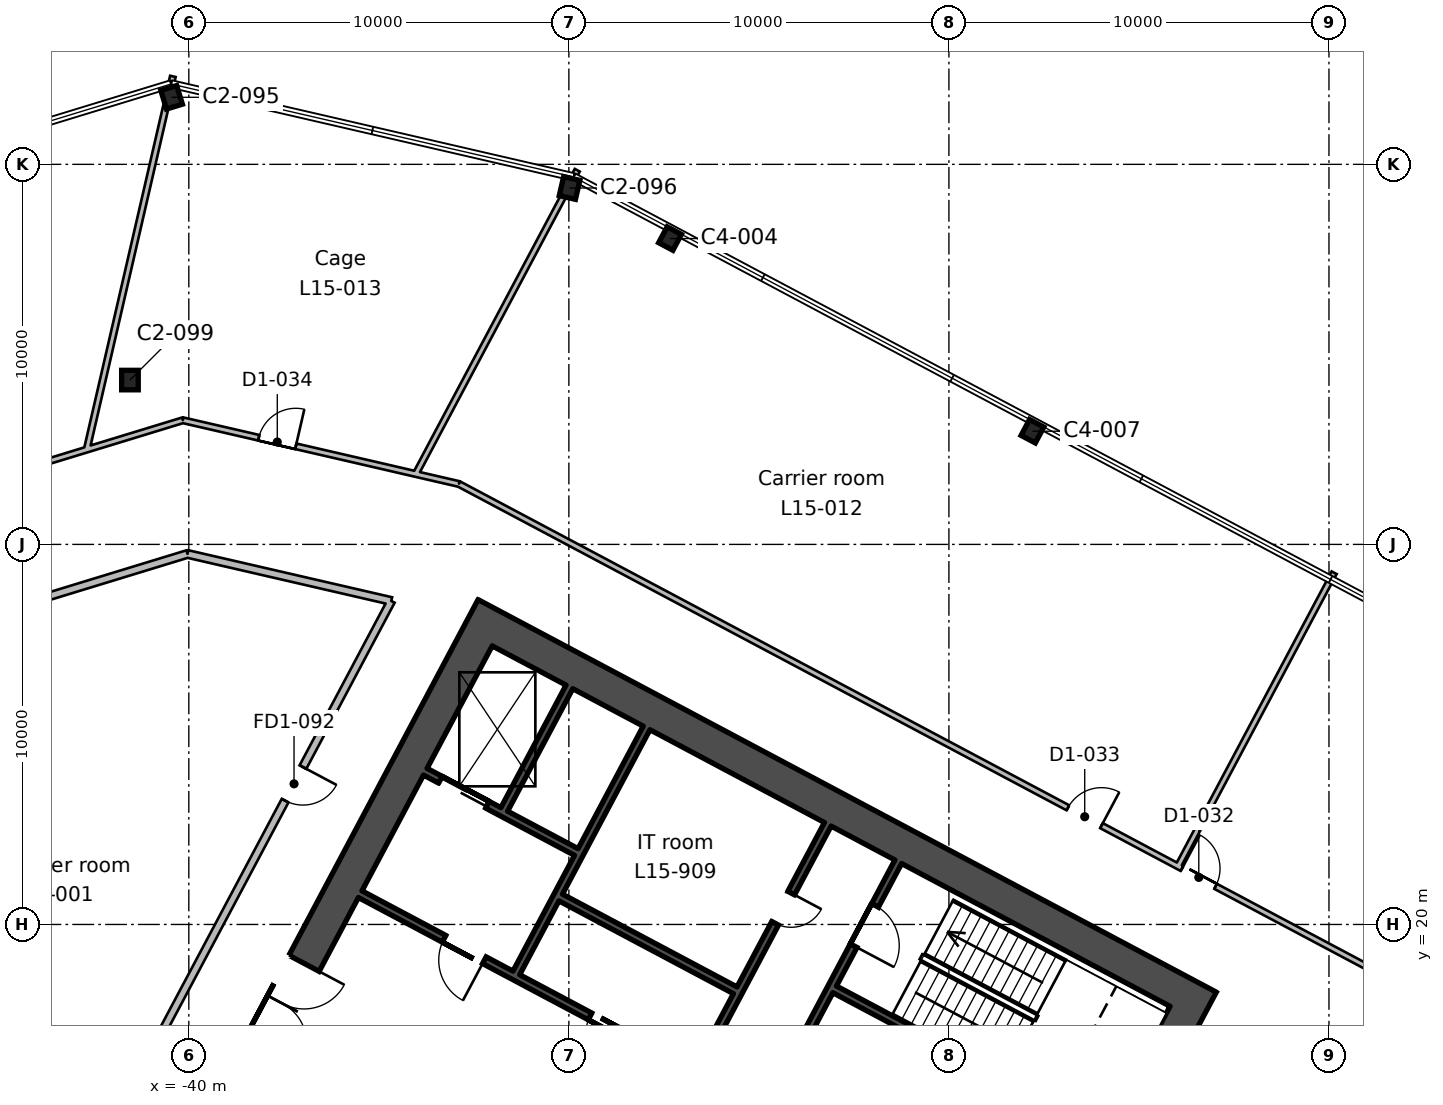
"""IFC4 building model, lengths in metres.
Left out: names, types, materials, properties, quantities, classifications, styles, units other than length and angle.
Written with IfcOpenShell. Run it as: python <this file> out.ifc"""

import sys

from ifc_helpers import new_model, si_unit, direction, frame, frame_2d, origin, origin_2d, place, context, subcontext, project, spatial, rectangle, i_section, extrude, element, fill, save


model = new_model("IFC4")
c1 = context("Model", 3, precision=1e-05, world=origin(), true_north=direction((0.0, 1.0)))
c2 = subcontext(c1, "Body", "Model", "MODEL_VIEW")
j1 = project(units=[si_unit("LENGTHUNIT", "METRE"), si_unit("PLANEANGLEUNIT", "RADIAN")], contexts=[c1])
p1 = place(None, origin())
s1 = spatial("IfcSite", under=j1, at=p1, CompositionType="ELEMENT")
p2 = place(p1, origin())
s2 = spatial("IfcBuilding", under=s1, at=p2, CompositionType="ELEMENT")
p3 = place(p2, frame((0.0, 0.0, 80.0)))
s3 = spatial("IfcBuildingStorey", under=s2, at=p3, CompositionType="ELEMENT", Elevation=80.0)
p4 = place(p3, frame((-17.802, 32.978, 0.0), z_axis=(0.0, 0.0, 1.0), x_axis=(-0.882947592859, 0.469471562786, 0.0)))
e1 = element("IfcColumn", 1, at=p4, inside=s3, PredefinedType="COLUMN", context=c2, shape_type="SweptSolid", body=[
    extrude(i_section(OverallWidth=0.424, OverallDepth=0.475, WebThickness=0.048, FlangeThickness=0.077, FilletRadius=0.015, at=origin_2d()), origin(), (0.0, 0.0, 1.0), 4.6),
])
p5 = place(p3, frame((-41.549, 34.324, 0.0), z_axis=(0.0, 0.0, 1.0), x_axis=(1.0, 0.0, 0.0)))
e2 = element("IfcColumn", 2, at=p5, inside=s3, PredefinedType="COLUMN", context=c2, shape_type="SweptSolid", body=[
    extrude(i_section(OverallWidth=0.437, OverallDepth=0.513, WebThickness=0.061, FlangeThickness=0.097, FilletRadius=0.015, at=origin_2d()), origin(), (0.0, 0.0, 1.0), 4.6),
])
p6 = place(p3, frame((-27.338, 38.048, 0.0), z_axis=(0.0, 0.0, 1.0), x_axis=(-0.882947592859, 0.469471562786, 0.0)))
e3 = element("IfcColumn", 3, at=p6, inside=s3, PredefinedType="COLUMN", context=c2, shape_type="SweptSolid", body=[
    extrude(i_section(OverallWidth=0.424, OverallDepth=0.475, WebThickness=0.048, FlangeThickness=0.077, FilletRadius=0.015, at=origin_2d()), origin(), (0.0, 0.0, 1.0), 4.6),
])
for number, where, z_axis, x_axis in (
    (4, (-29.982, 39.378, 0.0), (0.0, 0.0, 1.0), (-0.974, 0.225, 0.0)),
    (5, (-40.453, 41.764, 0.0), (0.0, 0.0, 1.0), (-0.956, -0.292, 0.0)),
):
    element("IfcColumn", number, at=place(p3, frame(where, z_axis=z_axis, x_axis=x_axis)), inside=s3, PredefinedType="COLUMN", context=c2, shape_type="SweptSolid", body=[
        extrude(i_section(OverallWidth=0.437, OverallDepth=0.513, WebThickness=0.061, FlangeThickness=0.097, FilletRadius=0.015, at=origin_2d()), origin(), (0.0, 0.0, 1.0), 4.6),
    ])
p7 = place(p3, frame((-13.362, 18.43, 0.0), z_axis=(0.0, 0.0, 1.0), x_axis=(-0.46947084998, -0.882947971864, 0.0)))
e6 = element("IfcWall", 6, at=p7, inside=s3, PredefinedType="SHEAR", context=c2, shape_type="SweptSolid", body=[
    extrude(rectangle(XDim=20.0, YDim=0.9, at=frame_2d((10.0, 0.0))), origin(), (0.0, 0.0, 1.0), 4.6),
])
p8 = place(p7, frame((7.0, 0.0, 0.0)))
e7 = element("IfcOpeningElement", 7, at=p8, cuts=e6, PredefinedType="OPENING", context=c2, shape_type="SweptSolid", body=[
    extrude(rectangle(XDim=2.4, YDim=2.4, at=frame_2d((1.2, 1.2))), frame((0.0, 0.46, 0.0), z_axis=(0.0, -1.0, 0.0), x_axis=(1.0, 0.0, 0.0)), (0.0, 0.0, 1.0), 0.92),
])
p9 = place(p3, frame((-31.992, 28.336, 0.0), z_axis=(0.0, 0.0, 1.0), x_axis=(-0.46947084998, -0.882947971864, 0.0)))
e8 = element("IfcWall", 8, at=p9, inside=s3, PredefinedType="SHEAR", context=c2, shape_type="SweptSolid", body=[
    extrude(rectangle(XDim=20.0, YDim=0.9, at=frame_2d((10.0, 0.0))), origin(), (0.0, 0.0, 1.0), 4.6),
])
p10 = place(p9, frame((10.6, 0.0, 0.0)))
e9 = element("IfcOpeningElement", 9, at=p10, cuts=e8, PredefinedType="OPENING", context=c2, shape_type="SweptSolid", body=[
    extrude(rectangle(XDim=2.4, YDim=2.4, at=frame_2d((1.2, 1.2))), frame((0.0, 0.46, 0.0), z_axis=(0.0, -1.0, 0.0), x_axis=(1.0, 0.0, 0.0)), (0.0, 0.0, 1.0), 0.92),
])
p11 = place(p3, frame((-13.97, 18.244, 0.0), z_axis=(0.0, 0.0, 1.0), x_axis=(-0.88294509198, 0.469476266226, 0.0)))
e10 = element("IfcWall", 10, at=p11, inside=s3, PredefinedType="SHEAR", context=c2, shape_type="SweptSolid", body=[
    extrude(rectangle(XDim=20.2, YDim=0.9, at=frame_2d((10.1, 0.0))), origin(), (0.0, 0.0, 1.0), 4.6),
])
p12 = place(p3, frame((-21.333, 21.649, 0.0), z_axis=(0.0, 0.0, 1.0), x_axis=(-0.469494272526, -0.882935517501, 0.0)))
e11 = element("IfcWall", 11, at=p12, inside=s3, PredefinedType="SHEAR", context=c2, shape_type="SweptSolid", body=[
    extrude(rectangle(XDim=7.3, YDim=0.2, at=frame_2d((3.65, 0.0))), origin(), (0.0, 0.0, 1.0), 4.6),
])
p13 = place(p12, frame((1.3, 0.0, 0.0)))
e12 = element("IfcOpeningElement", 12, at=p13, cuts=e11, PredefinedType="OPENING", context=c2, shape_type="SweptSolid", body=[
    extrude(rectangle(XDim=1.2, YDim=2.1, at=frame_2d((0.6, 1.05))), frame((0.0, 0.11, 0.0), z_axis=(0.0, -1.0, 0.0), x_axis=(1.0, 0.0, 0.0)), (0.0, 0.0, 1.0), 0.22),
])
p14 = place(p3, frame((-23.188, 22.635, 0.0), z_axis=(0.0, 0.0, 1.0), x_axis=(-0.469454336211, -0.882956752176, 0.0)))
e13 = element("IfcWall", 13, at=p14, inside=s3, PredefinedType="SHEAR", context=c2, shape_type="SweptSolid", body=[
    extrude(rectangle(XDim=7.3, YDim=0.2, at=frame_2d((3.65, 0.0))), origin(), (0.0, 0.0, 1.0), 4.6),
])
p15 = place(p14, frame((2.05, 0.0, 0.0)))
e14 = element("IfcOpeningElement", 14, at=p15, cuts=e13, PredefinedType="OPENING", context=c2, shape_type="SweptSolid", body=[
    extrude(rectangle(XDim=0.9, YDim=2.1, at=frame_2d((0.45, 1.05))), frame((0.0, 0.11, 0.0), z_axis=(0.0, -1.0, 0.0), x_axis=(1.0, 0.0, 0.0)), (0.0, 0.0, 1.0), 0.22),
])
p16 = place(p3, frame((-27.955, 25.171, 0.0), z_axis=(0.0, 0.0, 1.0), x_axis=(-0.469480409012, -0.88294288918, 0.0)))
e15 = element("IfcWall", 15, at=p16, inside=s3, PredefinedType="SHEAR", context=c2, shape_type="SweptSolid", body=[
    extrude(rectangle(XDim=7.3, YDim=0.2, at=frame_2d((3.65, 0.0))), origin(), (0.0, 0.0, 1.0), 4.6),
])
p17 = place(p3, frame((-29.986, 26.25, 0.0), z_axis=(0.0, 0.0, 1.0), x_axis=(-0.469494272526, -0.882935517501, 0.0)))
e16 = element("IfcWall", 16, at=p17, inside=s3, PredefinedType="SHEAR", context=c2, shape_type="SweptSolid", body=[
    extrude(rectangle(XDim=3.65, YDim=0.2, at=frame_2d((1.825, 0.0))), origin(), (0.0, 0.0, 1.0), 4.6),
])
p18 = place(p3, frame((-15.942, 14.536, 0.0), z_axis=(0.0, 0.0, 1.0), x_axis=(-0.882946947542, 0.469472776449, 0.0)))
e17 = element("IfcWall", 17, at=p18, inside=s3, PredefinedType="SHEAR", context=c2, shape_type="SweptSolid", body=[
    extrude(rectangle(XDim=8.0, YDim=0.2, at=frame_2d((4.0, 0.0))), origin(), (0.0, 0.0, 1.0), 4.6),
])
p19 = place(p3, frame((-29.804, 21.906, 0.0), z_axis=(0.0, 0.0, 1.0), x_axis=(-0.882960433586, 0.469447412093, 0.0)))
e18 = element("IfcWall", 18, at=p19, inside=s3, PredefinedType="SHEAR", context=c2, shape_type="SweptSolid", body=[
    extrude(rectangle(XDim=4.5, YDim=0.2, at=frame_2d((2.25, 0.0))), origin(), (0.0, 0.0, 1.0), 4.6),
])
p20 = place(p19, frame((2.65, 0.0, 0.0)))
e19 = element("IfcOpeningElement", 19, at=p20, cuts=e18, PredefinedType="OPENING", context=c2, shape_type="SweptSolid", body=[
    extrude(rectangle(XDim=1.4, YDim=2.4, at=frame_2d((0.7, 1.2))), frame((0.0, 0.11, 0.0), z_axis=(0.0, -1.0, 0.0), x_axis=(1.0, 0.0, 0.0)), (0.0, 0.0, 1.0), 0.22),
])
p21 = place(p3, frame((-25.623, 18.268, 0.0), z_axis=(0.0, 0.0, 1.0), x_axis=(-0.882953967957, 0.469459572775, 0.0)))
e20 = element("IfcWall", 20, at=p21, inside=s3, PredefinedType="SHEAR", context=c2, shape_type="SweptSolid", body=[
    extrude(rectangle(XDim=5.2, YDim=0.2, at=frame_2d((2.6, 0.0))), origin(), (0.0, 0.0, 1.0), 4.6),
])
p22 = place(p3, frame((-26.662, 16.102, 0.0), z_axis=(0.0, 0.0, 1.0), x_axis=(-0.882940221191, 0.469485426614, 0.0)))
e21 = element("IfcWall", 21, at=p22, inside=s3, PredefinedType="SHEAR", context=c2, shape_type="SweptSolid", body=[
    extrude(rectangle(XDim=10.0, YDim=0.2, at=frame_2d((5.0, 0.0))), origin(), (0.0, 0.0, 1.0), 4.6),
])
p23 = place(p22, frame((6.3, 0.0, 0.0)))
e22 = element("IfcOpeningElement", 22, at=p23, cuts=e21, PredefinedType="OPENING", context=c2, shape_type="SweptSolid", body=[
    extrude(rectangle(XDim=1.2, YDim=2.1, at=frame_2d((0.6, 1.05))), frame((0.0, 0.11, 0.0), z_axis=(0.0, -1.0, 0.0), x_axis=(1.0, 0.0, 0.0)), (0.0, 0.0, 1.0), 0.22),
])
p24 = place(p22, frame((2.25, 0.0, 0.0)))
e23 = element("IfcOpeningElement", 23, at=p24, cuts=e21, PredefinedType="OPENING", context=c2, shape_type="SweptSolid", body=[
    extrude(rectangle(XDim=0.9, YDim=2.1, at=frame_2d((0.45, 1.05))), frame((0.0, 0.11, 0.0), z_axis=(0.0, -1.0, 0.0), x_axis=(1.0, 0.0, 0.0)), (0.0, 0.0, 1.0), 0.22),
])
p25 = place(p3, frame((-42.653, 32.504, 0.0), z_axis=(0.0, 0.0, 1.0), x_axis=(-0.95632425254, -0.292307926687, 0.0)))
e24 = element("IfcWall", 24, at=p25, inside=s3, PredefinedType="PARTITIONING", context=c2, shape_type="SweptSolid", body=[
    extrude(rectangle(XDim=3.677, YDim=0.15, at=frame_2d((1.839, 0.0))), origin(), (0.0, 0.0, 1.0), 4.2),
])
p26 = place(p25, frame((1.461, 0.0, 0.0)))
e25 = element("IfcOpeningElement", 25, at=p26, cuts=e24, PredefinedType="OPENING", context=c2, shape_type="SweptSolid", body=[
    extrude(rectangle(XDim=1.0, YDim=2.1, at=frame_2d((0.5, 1.05))), frame((0.0, 0.085, 0.0), z_axis=(0.0, -1.0, 0.0), x_axis=(1.0, 0.0, 0.0)), (0.0, 0.0, 1.0), 0.17),
])
p27 = place(p3, frame((-40.034, 29.749, 0.0), z_axis=(0.0, 0.0, 1.0), x_axis=(-0.956357512161, -0.29219909126, 0.0)))
e26 = element("IfcWall", 26, at=p27, inside=s3, PredefinedType="PARTITIONING", context=c2, shape_type="SweptSolid", body=[
    extrude(rectangle(XDim=4.466, YDim=0.2, at=frame_2d((2.233, 0.0))), origin(), (0.0, 0.0, 1.0), 4.2),
])
p28 = place(p3, frame((-39.826, 18.82, 0.0), z_axis=(0.0, 0.0, 1.0), x_axis=(-0.469481685648, -0.882942210363, 0.0)))
e27 = element("IfcWall", 27, at=p28, inside=s3, PredefinedType="PARTITIONING", context=c2, shape_type="SweptSolid", body=[
    extrude(rectangle(XDim=6.816, YDim=0.2, at=frame_2d((3.408, 0.0))), origin(), (0.0, 0.0, 1.0), 4.2),
])
p29 = place(p3, frame((-40.419, 42.315, 0.0), z_axis=(0.0, 0.0, 1.0), x_axis=(-0.224924959868, -0.974376088802, 0.0)))
e28 = element("IfcWall", 28, at=p29, inside=s3, PredefinedType="PARTITIONING", context=c2, shape_type="SweptSolid", body=[
    extrude(rectangle(XDim=10.079, YDim=0.15, at=frame_2d((5.04, 0.0))), origin(), (0.0, 0.0, 1.0), 4.2),
])
p30 = place(p3, frame((-40.156, 33.267, 0.0), z_axis=(0.0, 0.0, 1.0), x_axis=(-0.956331245239, -0.292285048164, 0.0)))
e29 = element("IfcWall", 29, at=p30, inside=s3, PredefinedType="PARTITIONING", context=c2, shape_type="SweptSolid", body=[
    extrude(rectangle(XDim=2.611, YDim=0.15, at=frame_2d((1.306, 0.0))), origin(), (0.0, 0.0, 1.0), 4.2),
])
p31 = place(p3, frame((-40.157, 33.267, 0.0), z_axis=(0.0, 0.0, 1.0), x_axis=(0.974407195754, -0.224790161846, 0.0)))
e30 = element("IfcWall", 30, at=p31, inside=s3, PredefinedType="PARTITIONING", context=c2, shape_type="SweptSolid", body=[
    extrude(rectangle(XDim=5.143, YDim=0.15, at=frame_2d((2.571, 0.0))), origin(), (0.0, 0.0, 1.0), 4.2),
])
p32 = place(p31, frame((2.05, 0.0, 0.0)))
e31 = element("IfcOpeningElement", 31, at=p32, cuts=e30, PredefinedType="OPENING", context=c2, shape_type="SweptSolid", body=[
    extrude(rectangle(XDim=1.0, YDim=2.1, at=frame_2d((0.5, 1.05))), frame((0.0, 0.085, 0.0), z_axis=(0.0, -1.0, 0.0), x_axis=(1.0, 0.0, 0.0)), (0.0, 0.0, 1.0), 0.17),
])
p33 = place(p3, frame((-34.673, 28.512, 0.0), z_axis=(0.0, 0.0, 1.0), x_axis=(-0.974393439342, 0.224849784003, 0.0)))
e32 = element("IfcWall", 32, at=p33, inside=s3, PredefinedType="PARTITIONING", context=c2, shape_type="SweptSolid", body=[
    extrude(rectangle(XDim=5.502, YDim=0.2, at=frame_2d((2.751, 0.0))), origin(), (0.0, 0.0, 1.0), 4.2),
])
p34 = place(p3, frame((-34.673, 28.512, 0.0), z_axis=(0.0, 0.0, 1.0), x_axis=(-0.469440333182, -0.882964197226, 0.0)))
e33 = element("IfcWall", 33, at=p34, inside=s3, PredefinedType="PARTITIONING", context=c2, shape_type="SweptSolid", body=[
    extrude(rectangle(XDim=10.977, YDim=0.2, at=frame_2d((5.488, 0.0))), origin(), (0.0, 0.0, 1.0), 4.2),
])
p35 = place(p34, frame((4.95, 0.0, 0.0)))
e34 = element("IfcOpeningElement", 34, at=p35, cuts=e33, PredefinedType="OPENING", context=c2, shape_type="SweptSolid", body=[
    extrude(rectangle(XDim=1.0, YDim=2.1, at=frame_2d((0.5, 1.05))), frame((0.0, 0.11, 0.0), z_axis=(0.0, -1.0, 0.0), x_axis=(1.0, 0.0, 0.0)), (0.0, 0.0, 1.0), 0.22),
])
p36 = place(p3, frame((-35.146, 32.111, 0.0), z_axis=(0.0, 0.0, 1.0), x_axis=(0.974164552701, -0.225839377125, 0.0)))
e35 = element("IfcWall", 35, at=p36, inside=s3, PredefinedType="PARTITIONING", context=c2, shape_type="SweptSolid", body=[
    extrude(rectangle(XDim=1.183, YDim=0.15, at=frame_2d((0.591, 0.0))), origin(), (0.0, 0.0, 1.0), 4.2),
])
p37 = place(p3, frame((-29.779, 39.846, 0.0), z_axis=(0.0, 0.0, 1.0), x_axis=(-0.469479235169, -0.882943513338, 0.0)))
e36 = element("IfcWall", 36, at=p37, inside=s3, PredefinedType="PARTITIONING", context=c2, shape_type="SweptSolid", body=[
    extrude(rectangle(XDim=9.052, YDim=0.15, at=frame_2d((4.526, 0.0))), origin(), (0.0, 0.0, 1.0), 4.2),
])
p38 = place(p3, frame((-32.894, 31.59, 0.0), z_axis=(0.0, 0.0, 1.0), x_axis=(-0.97437296606, 0.22493848717, 0.0)))
e37 = element("IfcWall", 37, at=p38, inside=s3, PredefinedType="PARTITIONING", context=c2, shape_type="SweptSolid", body=[
    extrude(rectangle(XDim=1.129, YDim=0.15, at=frame_2d((0.564, 0.0))), origin(), (0.0, 0.0, 1.0), 4.2),
])
p39 = place(p3, frame((-32.894, 31.59, 0.0), z_axis=(0.0, 0.0, 1.0), x_axis=(0.882948512555, -0.469469833085, 0.0)))
e38 = element("IfcWall", 38, at=p39, inside=s3, PredefinedType="PARTITIONING", context=c2, shape_type="SweptSolid", body=[
    extrude(rectangle(XDim=37.255, YDim=0.15, at=frame_2d((18.627, 0.0))), origin(), (0.0, 0.0, 1.0), 4.2),
])
p40 = place(p39, frame((21.55, 0.0, 0.0)))
e39 = element("IfcOpeningElement", 39, at=p40, cuts=e38, PredefinedType="OPENING", context=c2, shape_type="SweptSolid", body=[
    extrude(rectangle(XDim=1.0, YDim=2.1, at=frame_2d((0.5, 1.05))), frame((0.0, 0.085, 0.0), z_axis=(0.0, -1.0, 0.0), x_axis=(1.0, 0.0, 0.0)), (0.0, 0.0, 1.0), 0.17),
])
p41 = place(p39, frame((18.15, 0.0, 0.0)))
e40 = element("IfcOpeningElement", 40, at=p41, cuts=e38, PredefinedType="OPENING", context=c2, shape_type="SweptSolid", body=[
    extrude(rectangle(XDim=1.0, YDim=2.1, at=frame_2d((0.5, 1.05))), frame((0.0, 0.085, 0.0), z_axis=(0.0, -1.0, 0.0), x_axis=(1.0, 0.0, 0.0)), (0.0, 0.0, 1.0), 0.17),
])
p42 = place(p3, frame((-9.864, 29.255, 0.0), z_axis=(0.0, 0.0, 1.0), x_axis=(-0.469472759909, -0.882946956336, 0.0)))
e41 = element("IfcWall", 41, at=p42, inside=s3, PredefinedType="PARTITIONING", context=c2, shape_type="SweptSolid", body=[
    extrude(rectangle(XDim=8.75, YDim=0.15, at=frame_2d((4.375, 0.0))), origin(), (0.0, 0.0, 1.0), 4.2),
])
p43 = place(p10, origin())
e42 = element("IfcDoor", 42, at=p43, inside=s3, OperationType="DOUBLE_DOOR_SINGLE_SWING", PredefinedType="DOOR", context=c2, shape_type="SweptSolid", body=[
    extrude(rectangle(XDim=2.4, YDim=2.4, at=frame_2d((1.2, 1.2))), frame((0.0, 0.025, 0.0), z_axis=(0.0, -1.0, 0.0), x_axis=(1.0, 0.0, 0.0)), (0.0, 0.0, 1.0), 0.05),
])
fill(e9, e42)
p44 = place(p23, origin())
e43 = element("IfcDoor", 43, at=p44, inside=s3, OperationType="SINGLE_SWING_LEFT", PredefinedType="DOOR", context=c2, shape_type="SweptSolid", body=[
    extrude(rectangle(XDim=1.2, YDim=2.1, at=frame_2d((0.6, 1.05))), frame((0.0, 0.025, 0.0), z_axis=(0.0, -1.0, 0.0), x_axis=(1.0, 0.0, 0.0)), (0.0, 0.0, 1.0), 0.05),
])
fill(e22, e43)
p45 = place(p13, origin())
e44 = element("IfcDoor", 44, at=p45, inside=s3, OperationType="SINGLE_SWING_RIGHT", PredefinedType="DOOR", context=c2, shape_type="SweptSolid", body=[
    extrude(rectangle(XDim=1.2, YDim=2.1, at=frame_2d((0.6, 1.05))), frame((0.0, 0.025, 0.0), z_axis=(0.0, -1.0, 0.0), x_axis=(1.0, 0.0, 0.0)), (0.0, 0.0, 1.0), 0.05),
])
fill(e12, e44)
p46 = place(p24, origin())
e45 = element("IfcDoor", 45, at=p46, inside=s3, OperationType="SINGLE_SWING_LEFT", PredefinedType="DOOR", context=c2, shape_type="SweptSolid", body=[
    extrude(rectangle(XDim=0.9, YDim=2.1, at=frame_2d((0.45, 1.05))), frame((0.0, 0.025, 0.0), z_axis=(0.0, -1.0, 0.0), x_axis=(1.0, 0.0, 0.0)), (0.0, 0.0, 1.0), 0.05),
])
fill(e23, e45)
p47 = place(p20, origin())
e46 = element("IfcDoor", 46, at=p47, inside=s3, OperationType="DOUBLE_DOOR_SLIDING", PredefinedType="DOOR", context=c2, shape_type="SweptSolid", body=[
    extrude(rectangle(XDim=1.4, YDim=2.4, at=frame_2d((0.7, 1.2))), frame((0.0, 0.025, 0.0), z_axis=(0.0, -1.0, 0.0), x_axis=(1.0, 0.0, 0.0)), (0.0, 0.0, 1.0), 0.05),
])
fill(e19, e46)
p48 = place(p15, origin())
e47 = element("IfcDoor", 47, at=p48, inside=s3, OperationType="SINGLE_SWING_LEFT", PredefinedType="DOOR", context=c2, shape_type="SweptSolid", body=[
    extrude(rectangle(XDim=0.9, YDim=2.1, at=frame_2d((0.45, 1.05))), frame((0.0, 0.025, 0.0), z_axis=(0.0, -1.0, 0.0), x_axis=(1.0, 0.0, 0.0)), (0.0, 0.0, 1.0), 0.05),
])
fill(e14, e47)
p49 = place(p35, origin())
e48 = element("IfcDoor", 48, at=p49, inside=s3, OperationType="SINGLE_SWING_LEFT", PredefinedType="DOOR", context=c2, shape_type="SweptSolid", body=[
    extrude(rectangle(XDim=1.0, YDim=2.1, at=frame_2d((0.5, 1.05))), frame((0.0, 0.025, 0.0), z_axis=(0.0, -1.0, 0.0), x_axis=(1.0, 0.0, 0.0)), (0.0, 0.0, 1.0), 0.05),
])
fill(e34, e48)
p50 = place(p40, origin())
e49 = element("IfcDoor", 49, at=p50, inside=s3, OperationType="SINGLE_SWING_LEFT", PredefinedType="DOOR", context=c2, shape_type="SweptSolid", body=[
    extrude(rectangle(XDim=1.0, YDim=2.1, at=frame_2d((0.5, 1.05))), frame((0.0, 0.025, 0.0), z_axis=(0.0, -1.0, 0.0), x_axis=(1.0, 0.0, 0.0)), (0.0, 0.0, 1.0), 0.05),
])
fill(e39, e49)
p51 = place(p41, origin())
e50 = element("IfcDoor", 50, at=p51, inside=s3, OperationType="SINGLE_SWING_RIGHT", PredefinedType="DOOR", context=c2, shape_type="SweptSolid", body=[
    extrude(rectangle(XDim=1.0, YDim=2.1, at=frame_2d((0.5, 1.05))), frame((0.0, 0.025, 0.0), z_axis=(0.0, -1.0, 0.0), x_axis=(1.0, 0.0, 0.0)), (0.0, 0.0, 1.0), 0.05),
])
fill(e40, e50)
p52 = place(p32, origin())
e51 = element("IfcDoor", 51, at=p52, inside=s3, OperationType="SINGLE_SWING_RIGHT", PredefinedType="DOOR", context=c2, shape_type="SweptSolid", body=[
    extrude(rectangle(XDim=1.0, YDim=2.1, at=frame_2d((0.5, 1.05))), frame((0.0, 0.025, 0.0), z_axis=(0.0, -1.0, 0.0), x_axis=(1.0, 0.0, 0.0)), (0.0, 0.0, 1.0), 0.05),
])
fill(e31, e51)
save(model, sys.argv[1])
